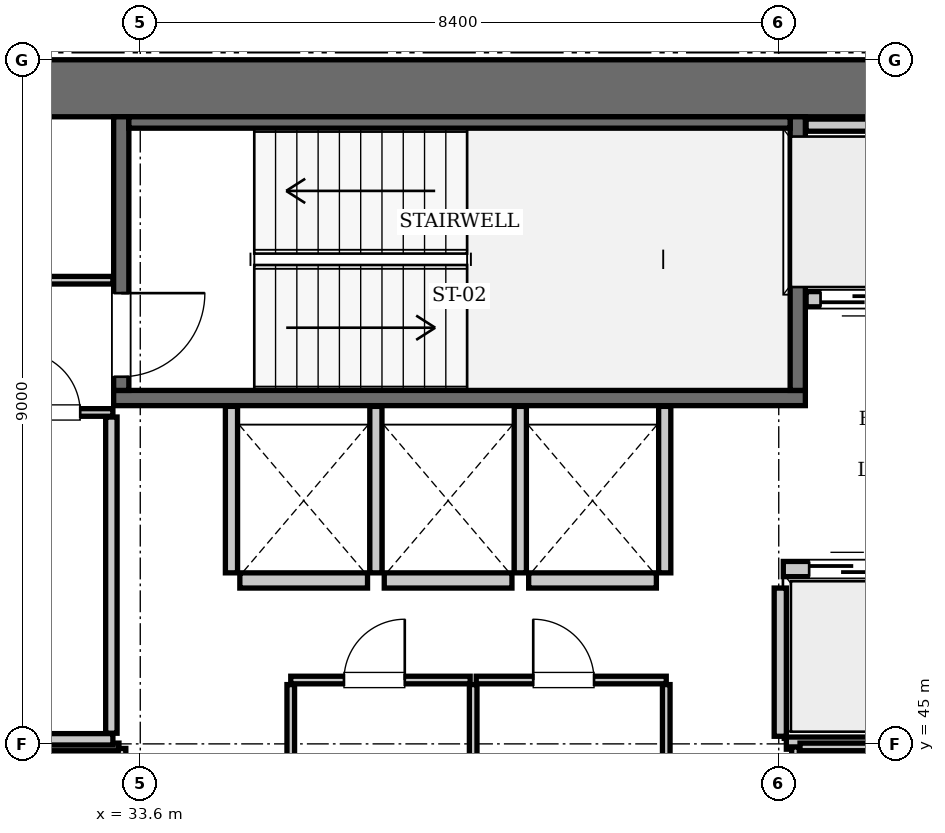
"""IFC4 building model, lengths in metres.
Left out: names, types, materials, properties, quantities, classifications, styles, units other than length and angle.
Written with IfcOpenShell. Run it as: python <this file> out.ifc"""

import sys

from ifc_helpers import new_model, si_unit, direction, frame, frame_2d, origin, place, context, subcontext, project, spatial, rectangle, extrude, element, fill, save


model = new_model("IFC4")
c1 = context("Model", 3, precision=1e-05, world=origin(), true_north=direction((0.0, 1.0)))
c2 = subcontext(c1, "Body", "Model", "MODEL_VIEW")
j1 = project(units=[si_unit("LENGTHUNIT", "METRE"), si_unit("PLANEANGLEUNIT", "RADIAN")], contexts=[c1])
p1 = place(None, origin())
s1 = spatial("IfcSite", under=j1, at=p1, CompositionType="ELEMENT")
p2 = place(p1, origin())
s2 = spatial("IfcBuilding", under=s1, at=p2, CompositionType="ELEMENT")
p3 = place(p2, frame((0.0, 0.0, 192.85)))
s3 = spatial("IfcBuildingStorey", under=s2, at=p3, CompositionType="ELEMENT", Elevation=192.85)
p4 = place(p3, frame((25.2, 53.625, 0.0), z_axis=(0.0, 0.0, 1.0), x_axis=(1.0, 0.0, 0.0)))
e1 = element("IfcWall", 1, at=p4, inside=s3, PredefinedType="SHEAR", context=c2, shape_type="SweptSolid", body=[
    extrude(rectangle(XDim=25.2, YDim=0.75, at=frame_2d((12.6, 0.0))), origin(), (0.0, 0.0, 1.0), 3.85),
])
p5 = place(p3, frame((33.25, 49.55, 0.0), z_axis=(0.0, 0.0, 1.0), x_axis=(1.0, 0.0, 0.0)))
e2 = element("IfcWall", 2, at=p5, inside=s3, PredefinedType="SOLIDWALL", context=c2, shape_type="SweptSolid", body=[
    extrude(rectangle(XDim=9.1, YDim=0.2, at=frame_2d((4.55, 0.0))), origin(), (0.0, 0.0, 1.0), 3.61),
])
p6 = place(p3, frame((42.25, 49.65, 0.0), z_axis=(0.0, 0.0, 1.0), x_axis=(0.0, 1.0, 0.0)))
e3 = element("IfcWall", 3, at=p6, inside=s3, PredefinedType="SOLIDWALL", context=c2, shape_type="SweptSolid", body=[
    extrude(rectangle(XDim=3.6, YDim=0.2, at=frame_2d((1.8, 0.0))), origin(), (0.0, 0.0, 1.0), 3.61),
])
p7 = place(p3, frame((33.35, 49.65, 0.0), z_axis=(0.0, 0.0, 1.0), x_axis=(0.0, 1.0, 0.0)))
e4 = element("IfcWall", 4, at=p7, inside=s3, PredefinedType="SOLIDWALL", context=c2, shape_type="SweptSolid", body=[
    extrude(rectangle(XDim=3.6, YDim=0.2, at=frame_2d((1.8, 0.0))), origin(), (0.0, 0.0, 1.0), 3.61),
])
p8 = place(p7, frame((0.18, 0.0, 0.0)))
e5 = element("IfcOpeningElement", 5, at=p8, cuts=e4, PredefinedType="OPENING", context=c2, shape_type="SweptSolid", body=[
    extrude(rectangle(XDim=1.1, YDim=2.15, at=frame_2d((0.55, 1.075))), frame((0.0, 0.11, 0.0), z_axis=(0.0, -1.0, 0.0), x_axis=(1.0, 0.0, 0.0)), (0.0, 0.0, 1.0), 0.22),
])
p9 = place(p3, frame((33.45, 53.175, 0.0), z_axis=(0.0, 0.0, 1.0), x_axis=(1.0, 0.0, 0.0)))
e6 = element("IfcWall", 6, at=p9, inside=s3, PredefinedType="SOLIDWALL", context=c2, shape_type="SweptSolid", body=[
    extrude(rectangle(XDim=8.7, YDim=0.15, at=frame_2d((4.35, 0.0))), origin(), (0.0, 0.0, 1.0), 3.61),
])
p10 = place(p3, frame((42.06, 47.3, 0.0), z_axis=(0.0, 0.0, 1.0), x_axis=(1.0, 0.0, 0.0)))
e7 = element("IfcWall", 7, at=p10, inside=s3, PredefinedType="SOLIDWALL", context=c2, shape_type="SweptSolid", body=[
    extrude(rectangle(XDim=1.68, YDim=0.2, at=frame_2d((0.84, 0.0))), origin(), (0.0, 0.0, 1.0), 3.61),
])
p11 = place(p10, frame((0.34, 0.0, 0.0)))
e8 = element("IfcOpeningElement", 8, at=p11, cuts=e7, PredefinedType="OPENING", context=c2, shape_type="SweptSolid", body=[
    extrude(rectangle(XDim=1.0, YDim=2.15, at=frame_2d((0.5, 1.075))), frame((0.0, 0.11, 0.0), z_axis=(0.0, -1.0, 0.0), x_axis=(1.0, 0.0, 0.0)), (0.0, 0.0, 1.0), 0.22),
])
p12 = place(p3, frame((42.36, 50.85, 0.0), z_axis=(0.0, 0.0, 1.0), x_axis=(1.0, 0.0, 0.0)))
e9 = element("IfcWall", 9, at=p12, inside=s3, PredefinedType="SOLIDWALL", context=c2, shape_type="SweptSolid", body=[
    extrude(rectangle(XDim=1.38, YDim=0.2, at=frame_2d((0.69, 0.0))), origin(), (0.0, 0.0, 1.0), 3.61),
])
p13 = place(p12, frame((0.19, 0.0, 0.0)))
e10 = element("IfcOpeningElement", 10, at=p13, cuts=e9, PredefinedType="OPENING", context=c2, shape_type="SweptSolid", body=[
    extrude(rectangle(XDim=1.0, YDim=2.15, at=frame_2d((0.5, 1.075))), frame((0.0, 0.11, 0.0), z_axis=(0.0, -1.0, 0.0), x_axis=(1.0, 0.0, 0.0)), (0.0, 0.0, 1.0), 0.22),
])
p14 = place(p3, frame((34.91, 47.15, 0.0), z_axis=(0.0, 0.0, 1.0), x_axis=(1.0, 0.0, 0.0)))
e11 = element("IfcWall", 11, at=p14, inside=s3, PredefinedType="SOLIDWALL", context=c2, shape_type="SweptSolid", body=[
    extrude(rectangle(XDim=1.68, YDim=0.2, at=frame_2d((0.84, 0.0))), origin(), (0.0, 0.0, 1.0), 3.61),
])
for number, where, z_axis, x_axis in (
    (12, (36.81, 47.15, 0.0), (0.0, 0.0, 1.0), (1.0, 0.0, 0.0)),
    (13, (38.71, 47.15, 0.0), (0.0, 0.0, 1.0), (1.0, 0.0, 0.0)),
):
    element("IfcWall", number, at=place(p3, frame(where, z_axis=z_axis, x_axis=x_axis)), inside=s3, PredefinedType="SOLIDWALL", context=c2, shape_type="SweptSolid", body=[
        extrude(rectangle(XDim=1.68, YDim=0.2, at=frame_2d((0.84, 0.0))), origin(), (0.0, 0.0, 1.0), 3.61),
    ])
p15 = place(p3, frame((42.02, 45.1, 0.0), z_axis=(0.0, 0.0, 1.0), x_axis=(0.0, 1.0, 0.0)))
e14 = element("IfcWall", 14, at=p15, inside=s3, PredefinedType="SOLIDWALL", context=c2, shape_type="SweptSolid", body=[
    extrude(rectangle(XDim=1.95, YDim=0.16, at=frame_2d((0.975, 0.0))), origin(), (0.0, 0.0, 1.0), 3.61),
])
p16 = place(p3, frame((42.1, 45.01, 0.0), z_axis=(0.0, 0.0, 1.0), x_axis=(1.0, 0.0, 0.0)))
e15 = element("IfcWall", 15, at=p16, inside=s3, PredefinedType="SOLIDWALL", context=c2, shape_type="SweptSolid", body=[
    extrude(rectangle(XDim=3.45, YDim=0.16, at=frame_2d((1.725, 0.0))), origin(), (0.0, 0.0, 1.0), 3.61),
])
p17 = place(p3, frame((42.36, 53.14, 0.0), z_axis=(0.0, 0.0, 1.0), x_axis=(1.0, 0.0, 0.0)))
e16 = element("IfcWall", 16, at=p17, inside=s3, PredefinedType="SOLIDWALL", context=c2, shape_type="SweptSolid", body=[
    extrude(rectangle(XDim=3.14, YDim=0.16, at=frame_2d((1.57, 0.0))), origin(), (0.0, 0.0, 1.0), 3.61),
])
for number, where, z_axis, x_axis in (
    (17, (34.8, 47.25, 0.0), (0.0, 0.0, 1.0), (0.0, 1.0, 0.0)),
    (18, (36.7, 47.25, 0.0), (0.0, 0.0, 1.0), (0.0, 1.0, 0.0)),
    (19, (38.6, 47.25, 0.0), (0.0, 0.0, 1.0), (0.0, 1.0, 0.0)),
    (20, (40.5, 47.25, 0.0), (0.0, 0.0, 1.0), (0.0, 1.0, 0.0)),
):
    element("IfcWall", number, at=place(p3, frame(where, z_axis=z_axis, x_axis=x_axis)), inside=s3, PredefinedType="SOLIDWALL", context=c2, shape_type="SweptSolid", body=[
        extrude(rectangle(XDim=2.19, YDim=0.16, at=frame_2d((1.095, 0.0))), origin(), (0.0, 0.0, 1.0), 3.61),
    ])
p18 = place(p3, frame((31.84, 44.96, 0.0), z_axis=(0.0, 0.0, 1.0), x_axis=(1.0, 0.0, 0.0)))
e21 = element("IfcWall", 21, at=p18, inside=s3, PredefinedType="PARTITIONING", context=c2, shape_type="SweptSolid", body=[
    extrude(rectangle(XDim=1.48, YDim=0.1, at=frame_2d((0.74, 0.0))), origin(), (0.0, 0.0, 1.0), 3.61),
])
p19 = place(p3, frame((33.36, 42.21, 0.0), z_axis=(0.0, 0.0, 1.0), x_axis=(0.0, 1.0, 0.0)))
e22 = element("IfcWall", 22, at=p19, inside=s3, PredefinedType="PARTITIONING", context=c2, shape_type="SweptSolid", body=[
    extrude(rectangle(XDim=2.73, YDim=0.1, at=frame_2d((1.365, 0.0))), origin(), (0.0, 0.0, 1.0), 3.61),
])
p20 = place(p3, frame((35.58, 45.84, 0.0), z_axis=(0.0, 0.0, 1.0), x_axis=(1.0, 0.0, 0.0)))
e23 = element("IfcWall", 23, at=p20, inside=s3, PredefinedType="PARTITIONING", context=c2, shape_type="SweptSolid", body=[
    extrude(rectangle(XDim=2.36, YDim=0.1, at=frame_2d((1.18, 0.0))), origin(), (0.0, 0.0, 1.0), 3.61),
])
p21 = place(p20, frame((0.7, 0.0, 0.0)))
e24 = element("IfcOpeningElement", 24, at=p21, cuts=e23, PredefinedType="OPENING", context=c2, shape_type="SweptSolid", body=[
    extrude(rectangle(XDim=0.8, YDim=2.05, at=frame_2d((0.4, 1.025))), frame((0.0, 0.06, 0.0), z_axis=(0.0, -1.0, 0.0), x_axis=(1.0, 0.0, 0.0)), (0.0, 0.0, 1.0), 0.12),
])
p22 = place(p3, frame((38.02, 45.84, 0.0), z_axis=(0.0, 0.0, 1.0), x_axis=(1.0, 0.0, 0.0)))
e25 = element("IfcWall", 25, at=p22, inside=s3, PredefinedType="PARTITIONING", context=c2, shape_type="SweptSolid", body=[
    extrude(rectangle(XDim=2.5, YDim=0.1, at=frame_2d((1.25, 0.0))), origin(), (0.0, 0.0, 1.0), 3.61),
])
p23 = place(p22, frame((0.75, 0.0, 0.0)))
e26 = element("IfcOpeningElement", 26, at=p23, cuts=e25, PredefinedType="OPENING", context=c2, shape_type="SweptSolid", body=[
    extrude(rectangle(XDim=0.8, YDim=2.05, at=frame_2d((0.4, 1.025))), frame((0.0, 0.06, 0.0), z_axis=(0.0, -1.0, 0.0), x_axis=(1.0, 0.0, 0.0)), (0.0, 0.0, 1.0), 0.12),
])
for number, where, z_axis, x_axis in (
    (27, (35.58, 44.7, 0.0), (0.0, 0.0, 1.0), (0.0, 1.0, 0.0)),
    (28, (37.98, 44.7, 0.0), (0.0, 0.0, 1.0), (0.0, 1.0, 0.0)),
    (29, (40.52, 44.7, 0.0), (0.0, 0.0, 1.0), (0.0, 1.0, 0.0)),
):
    element("IfcWall", number, at=place(p3, frame(where, z_axis=z_axis, x_axis=x_axis)), inside=s3, PredefinedType="PARTITIONING", context=c2, shape_type="SweptSolid", body=[
        extrude(rectangle(XDim=1.08, YDim=0.1, at=frame_2d((0.54, 0.0))), origin(), (0.0, 0.0, 1.0), 3.61),
    ])
p24 = place(p3, frame((42.22, 42.2, 0.0), z_axis=(0.0, 0.0, 1.0), x_axis=(0.0, 1.0, 0.0)))
e30 = element("IfcWall", 30, at=p24, inside=s3, PredefinedType="PARTITIONING", context=c2, shape_type="SweptSolid", body=[
    extrude(rectangle(XDim=2.76, YDim=0.1, at=frame_2d((1.38, 0.0))), origin(), (0.0, 0.0, 1.0), 3.61),
])
p25 = place(p24, frame((0.65, 0.0, 0.0)))
e31 = element("IfcOpeningElement", 31, at=p25, cuts=e30, PredefinedType="OPENING", context=c2, shape_type="SweptSolid", body=[
    extrude(rectangle(XDim=0.8, YDim=2.05, at=frame_2d((0.4, 1.025))), frame((0.0, 0.06, 0.0), z_axis=(0.0, -1.0, 0.0), x_axis=(1.0, 0.0, 0.0)), (0.0, 0.0, 1.0), 0.12),
])
p26 = place(p3, frame((42.28, 44.96, 0.0), z_axis=(0.0, 0.0, 1.0), x_axis=(1.0, 0.0, 0.0)))
e32 = element("IfcWall", 32, at=p26, inside=s3, PredefinedType="PARTITIONING", context=c2, shape_type="SweptSolid", body=[
    extrude(rectangle(XDim=1.3, YDim=0.1, at=frame_2d((0.65, 0.0))), origin(), (0.0, 0.0, 1.0), 3.61),
])
p27 = place(p3, frame((30.06, 45.06, 0.0), z_axis=(0.0, 0.0, 1.0), x_axis=(1.0, 0.0, 0.0)))
e33 = element("IfcWall", 33, at=p27, inside=s3, PredefinedType="PARTITIONING", context=c2, shape_type="SweptSolid", body=[
    extrude(rectangle(XDim=3.18, YDim=0.15, at=frame_2d((1.59, 0.0))), origin(), (0.0, 0.0, 1.0), 3.61),
])
p28 = place(p3, frame((33.22, 45.14, 0.0), z_axis=(0.0, 0.0, 1.0), x_axis=(0.0, 1.0, 0.0)))
e34 = element("IfcWall", 34, at=p28, inside=s3, PredefinedType="PARTITIONING", context=c2, shape_type="SweptSolid", body=[
    extrude(rectangle(XDim=4.16, YDim=0.15, at=frame_2d((2.08, 0.0))), origin(), (0.0, 0.0, 1.0), 3.61),
])
p29 = place(p3, frame((30.06, 49.36, 0.0), z_axis=(0.0, 0.0, 1.0), x_axis=(1.0, 0.0, 0.0)))
e35 = element("IfcWall", 35, at=p29, inside=s3, PredefinedType="PARTITIONING", context=c2, shape_type="SweptSolid", body=[
    extrude(rectangle(XDim=3.18, YDim=0.1, at=frame_2d((1.59, 0.0))), origin(), (0.0, 0.0, 1.0), 3.61),
])
p30 = place(p29, frame((1.95, 0.0, 0.0)))
e36 = element("IfcOpeningElement", 36, at=p30, cuts=e35, PredefinedType="OPENING", context=c2, shape_type="SweptSolid", body=[
    extrude(rectangle(XDim=0.8, YDim=2.05, at=frame_2d((0.4, 1.025))), frame((0.0, 0.06, 0.0), z_axis=(0.0, -1.0, 0.0), x_axis=(1.0, 0.0, 0.0)), (0.0, 0.0, 1.0), 0.12),
])
p31 = place(p3, frame((31.82, 51.1, 0.0), z_axis=(0.0, 0.0, 1.0), x_axis=(1.0, 0.0, 0.0)))
e37 = element("IfcWall", 37, at=p31, inside=s3, PredefinedType="PARTITIONING", context=c2, shape_type="SweptSolid", body=[
    extrude(rectangle(XDim=1.42, YDim=0.1, at=frame_2d((0.71, 0.0))), origin(), (0.0, 0.0, 1.0), 3.61),
])
p32 = place(p8, frame((1.1, 0.0, 0.0), z_axis=(0.0, 0.0, 1.0), x_axis=(-1.0, 0.0, 0.0)))
e38 = element("IfcDoor", 38, at=p32, inside=s3, OperationType="SINGLE_SWING_LEFT", PredefinedType="DOOR", context=c2, shape_type="SweptSolid", body=[
    extrude(rectangle(XDim=1.1, YDim=2.15, at=frame_2d((0.55, 1.075))), frame((0.0, 0.025, 0.0), z_axis=(0.0, -1.0, 0.0), x_axis=(1.0, 0.0, 0.0)), (0.0, 0.0, 1.0), 0.05),
])
fill(e5, e38)
p33 = place(p11, origin())
e39 = element("IfcDoor", 39, at=p33, inside=s3, OperationType="SLIDING_TO_LEFT", PredefinedType="DOOR", context=c2, shape_type="SweptSolid", body=[
    extrude(rectangle(XDim=1.0, YDim=2.15, at=frame_2d((0.5, 1.075))), frame((0.0, 0.025, 0.0), z_axis=(0.0, -1.0, 0.0), x_axis=(1.0, 0.0, 0.0)), (0.0, 0.0, 1.0), 0.05),
])
fill(e8, e39)
p34 = place(p13, frame((1.0, 0.0, 0.0), z_axis=(0.0, 0.0, 1.0), x_axis=(-1.0, 0.0, 0.0)))
e40 = element("IfcDoor", 40, at=p34, inside=s3, OperationType="SLIDING_TO_LEFT", PredefinedType="DOOR", context=c2, shape_type="SweptSolid", body=[
    extrude(rectangle(XDim=1.0, YDim=2.15, at=frame_2d((0.5, 1.075))), frame((0.0, 0.025, 0.0), z_axis=(0.0, -1.0, 0.0), x_axis=(1.0, 0.0, 0.0)), (0.0, 0.0, 1.0), 0.05),
])
fill(e10, e40)
p35 = place(p21, origin())
e41 = element("IfcDoor", 41, at=p35, inside=s3, OperationType="SINGLE_SWING_RIGHT", PredefinedType="DOOR", context=c2, shape_type="SweptSolid", body=[
    extrude(rectangle(XDim=0.8, YDim=2.05, at=frame_2d((0.4, 1.025))), frame((0.0, 0.025, 0.0), z_axis=(0.0, -1.0, 0.0), x_axis=(1.0, 0.0, 0.0)), (0.0, 0.0, 1.0), 0.05),
])
fill(e24, e41)
p36 = place(p23, origin())
e42 = element("IfcDoor", 42, at=p36, inside=s3, OperationType="SINGLE_SWING_LEFT", PredefinedType="DOOR", context=c2, shape_type="SweptSolid", body=[
    extrude(rectangle(XDim=0.8, YDim=2.05, at=frame_2d((0.4, 1.025))), frame((0.0, 0.025, 0.0), z_axis=(0.0, -1.0, 0.0), x_axis=(1.0, 0.0, 0.0)), (0.0, 0.0, 1.0), 0.05),
])
fill(e26, e42)
p37 = place(p30, origin())
e43 = element("IfcDoor", 43, at=p37, inside=s3, OperationType="SINGLE_SWING_LEFT", PredefinedType="DOOR", context=c2, shape_type="SweptSolid", body=[
    extrude(rectangle(XDim=0.8, YDim=2.05, at=frame_2d((0.4, 1.025))), frame((0.0, 0.025, 0.0), z_axis=(0.0, -1.0, 0.0), x_axis=(1.0, 0.0, 0.0)), (0.0, 0.0, 1.0), 0.05),
])
fill(e36, e43)
save(model, sys.argv[1])
